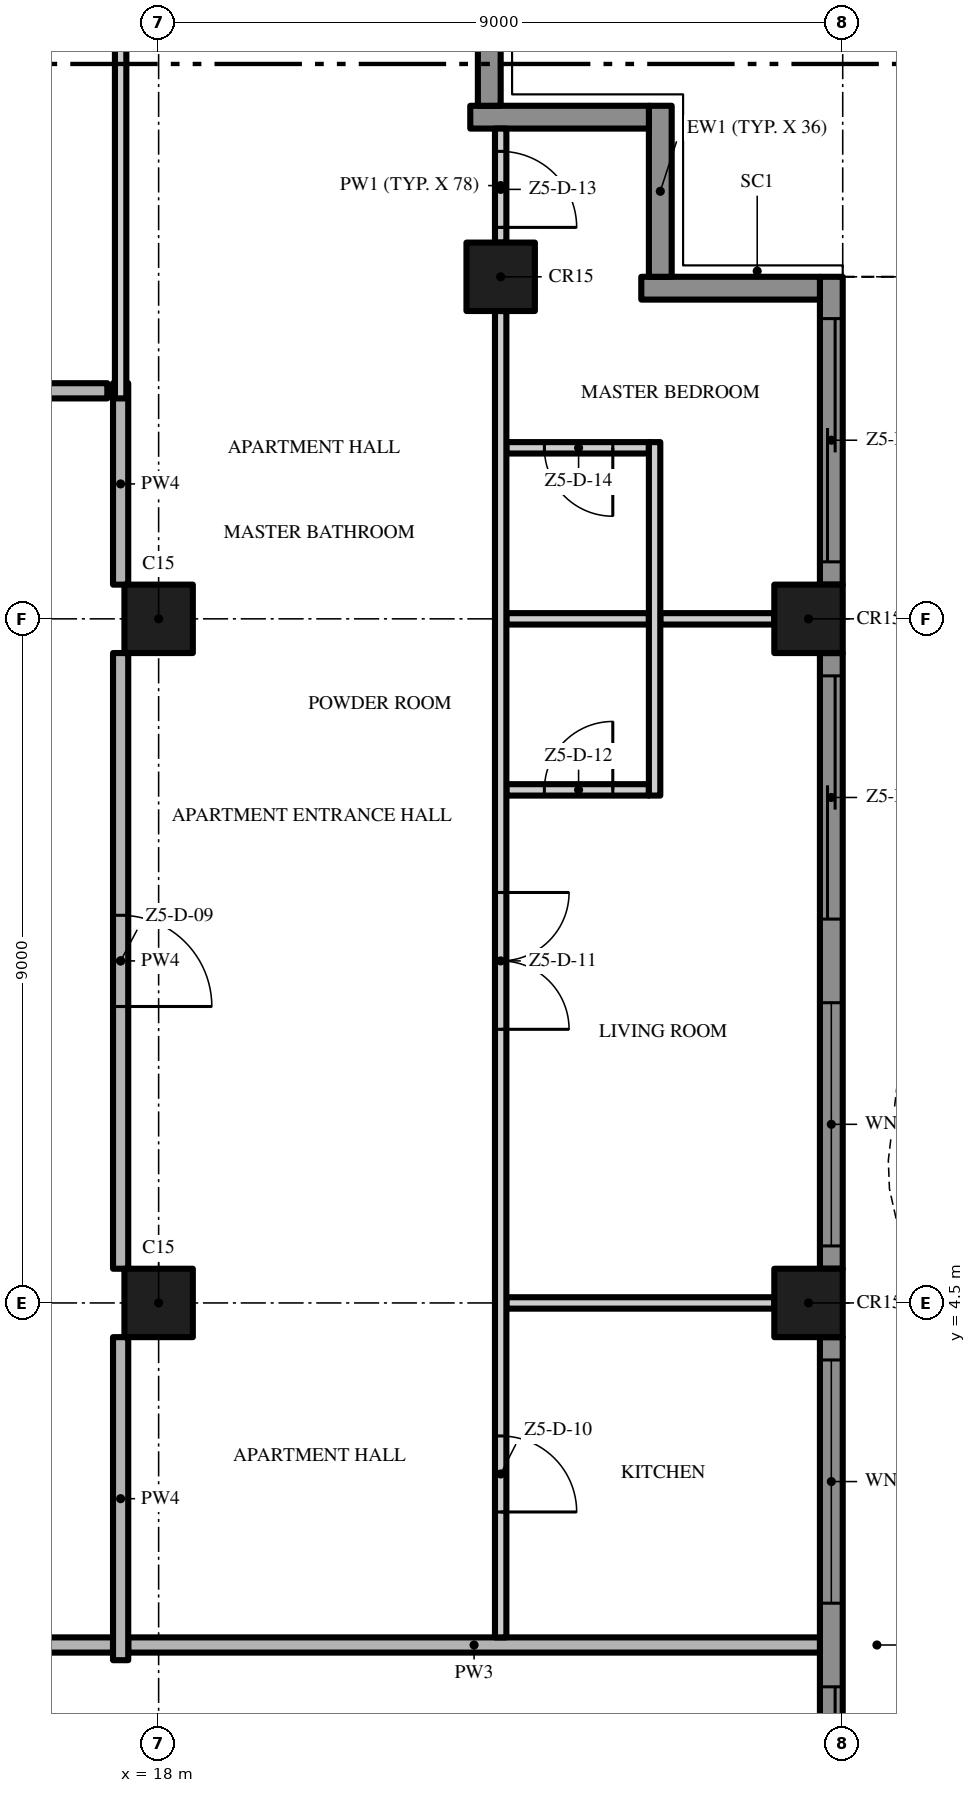
"""IFC4 building model, lengths in metres.
Left out: names, types, materials, properties, quantities, classifications, styles, units other than length and angle.
Written with IfcOpenShell. Run it as: python <this file> out.ifc"""

import sys

from ifc_helpers import new_model, si_unit, direction, frame, frame_2d, origin, origin_2d, place, context, subcontext, project, spatial, polyline, rectangle, outline, extrude, element, fill, save


model = new_model("IFC4")
c1 = context("Model", 3, precision=1e-05, world=origin(), true_north=direction((0.0, 1.0)))
c2 = subcontext(c1, "Body", "Model", "MODEL_VIEW")
j1 = project(units=[si_unit("LENGTHUNIT", "METRE"), si_unit("PLANEANGLEUNIT", "RADIAN")], contexts=[c1])
p1 = place(None, origin())
s1 = spatial("IfcSite", under=j1, at=p1, CompositionType="ELEMENT")
p2 = place(p1, origin())
s2 = spatial("IfcBuilding", under=s1, at=p2, CompositionType="ELEMENT")
p3 = place(p2, frame((0.0, 0.0, 276.8)))
s3 = spatial("IfcBuildingStorey", under=s2, at=p3, CompositionType="ELEMENT", Elevation=276.8)
for number, where, z_axis, x_axis in (
    (1, (18.0, 13.5, 0.0), (0.0, 0.0, 1.0), (1.0, 0.0, 0.0)),
    (2, (18.0, 4.5, 0.0), (0.0, 0.0, 1.0), (1.0, 0.0, 0.0)),
    (3, (26.55, 13.5, 0.0), (0.0, 0.0, 1.0), (1.0, 0.0, 0.0)),
    (4, (22.5, 18.0, 0.0), (0.0, 0.0, 1.0), (1.0, 0.0, 0.0)),
    (5, (26.55, 4.5, 0.0), (0.0, 0.0, 1.0), (1.0, 0.0, 0.0)),
):
    element("IfcColumn", number, at=place(p3, frame(where, z_axis=z_axis, x_axis=x_axis)), inside=s3, PredefinedType="COLUMN", context=c2, shape_type="SweptSolid", body=[
        extrude(rectangle(XDim=0.9, YDim=0.9, at=origin_2d()), origin(), (0.0, 0.0, 1.0), 3.5),
    ])
p4 = place(p3, frame((26.85, 4.05, 0.0), z_axis=(0.0, 0.0, 1.0), x_axis=(0.0, -1.0, 0.0)))
e6 = element("IfcWall", 6, at=p4, inside=s3, PredefinedType="SOLIDWALL", context=c2, shape_type="SweptSolid", body=[
    extrude(rectangle(XDim=8.1, YDim=0.3, at=frame_2d((4.05, 0.0))), origin(), (0.0, 0.0, 1.0), 3.5),
])
p5 = place(p4, frame((4.6, 0.0, 0.0)))
e7 = element("IfcOpeningElement", 7, at=p5, cuts=e6, PredefinedType="OPENING", context=c2, shape_type="SweptSolid", body=[
    extrude(rectangle(XDim=3.2, YDim=2.4, at=frame_2d((1.6, 1.2))), frame((0.0, 0.16, 0.0), z_axis=(0.0, -1.0, 0.0), x_axis=(1.0, 0.0, 0.0)), (0.0, 0.0, 1.0), 0.32),
])
p6 = place(p4, frame((0.3, 0.0, 0.45)))
e8 = element("IfcOpeningElement", 8, at=p6, cuts=e6, PredefinedType="OPENING", context=c2, shape_type="SweptSolid", body=[
    extrude(rectangle(XDim=3.2, YDim=2.65, at=frame_2d((1.6, 1.325))), frame((0.0, 0.16, 0.0), z_axis=(0.0, -1.0, 0.0), x_axis=(1.0, 0.0, 0.0)), (0.0, 0.0, 1.0), 0.32),
])
p7 = place(p3, frame((26.85, 13.05, 0.0), z_axis=(0.0, 0.0, 1.0), x_axis=(0.0, -1.0, 0.0)))
e9 = element("IfcWall", 9, at=p7, inside=s3, PredefinedType="SOLIDWALL", context=c2, shape_type="SweptSolid", body=[
    extrude(rectangle(XDim=8.1, YDim=0.3, at=frame_2d((4.05, 0.0))), origin(), (0.0, 0.0, 1.0), 3.5),
])
p8 = place(p7, frame((4.6, 0.0, 0.45)))
e10 = element("IfcOpeningElement", 10, at=p8, cuts=e9, PredefinedType="OPENING", context=c2, shape_type="SweptSolid", body=[
    extrude(rectangle(XDim=3.2, YDim=2.65, at=frame_2d((1.6, 1.325))), frame((0.0, 0.16, 0.0), z_axis=(0.0, -1.0, 0.0), x_axis=(1.0, 0.0, 0.0)), (0.0, 0.0, 1.0), 0.32),
])
p9 = place(p7, frame((0.3, 0.0, 0.0)))
e11 = element("IfcOpeningElement", 11, at=p9, cuts=e9, PredefinedType="OPENING", context=c2, shape_type="SweptSolid", body=[
    extrude(rectangle(XDim=3.2, YDim=2.4, at=frame_2d((1.6, 1.2))), frame((0.0, 0.16, 0.0), z_axis=(0.0, -1.0, 0.0), x_axis=(1.0, 0.0, 0.0)), (0.0, 0.0, 1.0), 0.32),
])
p10 = place(p3, frame((26.85, 18.0, 0.0), z_axis=(0.0, 0.0, 1.0), x_axis=(0.0, -1.0, 0.0)))
e12 = element("IfcWall", 12, at=p10, inside=s3, PredefinedType="SOLIDWALL", context=c2, shape_type="SweptSolid", body=[
    extrude(rectangle(XDim=4.05, YDim=0.3, at=frame_2d((2.025, 0.0))), origin(), (0.0, 0.0, 1.0), 3.5),
])
p11 = place(p10, frame((0.55, 0.0, 0.0)))
e13 = element("IfcOpeningElement", 13, at=p11, cuts=e12, PredefinedType="OPENING", context=c2, shape_type="SweptSolid", body=[
    extrude(rectangle(XDim=3.2, YDim=2.4, at=frame_2d((1.6, 1.2))), frame((0.0, 0.16, 0.0), z_axis=(0.0, -1.0, 0.0), x_axis=(1.0, 0.0, 0.0)), (0.0, 0.0, 1.0), 0.32),
])
p12 = place(p3, frame((24.35, 17.85, 0.0), z_axis=(0.0, 0.0, 1.0), x_axis=(1.0, 0.0, 0.0)))
e14 = element("IfcWall", 14, at=p12, inside=s3, PredefinedType="SOLIDWALL", context=c2, shape_type="SweptSolid", body=[
    extrude(rectangle(XDim=2.35, YDim=0.3, at=frame_2d((1.175, 0.0))), origin(), (0.0, 0.0, 1.0), 3.5),
])
p13 = place(p3, frame((24.6, 20.25, 0.0), z_axis=(0.0, 0.0, 1.0), x_axis=(0.0, -1.0, 0.0)))
e15 = element("IfcWall", 15, at=p13, inside=s3, PredefinedType="SOLIDWALL", context=c2, shape_type="SweptSolid", body=[
    extrude(rectangle(XDim=2.25, YDim=0.3, at=frame_2d((1.125, 0.0))), origin(), (0.0, 0.0, 1.0), 3.5),
])
p14 = place(p3, frame((22.1, 20.1, 0.0), z_axis=(0.0, 0.0, 1.0), x_axis=(1.0, 0.0, 0.0)))
e16 = element("IfcWall", 16, at=p14, inside=s3, PredefinedType="SOLIDWALL", context=c2, shape_type="SweptSolid", body=[
    extrude(rectangle(XDim=2.35, YDim=0.3, at=frame_2d((1.175, 0.0))), origin(), (0.0, 0.0, 1.0), 3.5),
])
p15 = place(p3, frame((22.35, 22.5, 0.0), z_axis=(0.0, 0.0, 1.0), x_axis=(0.0, -1.0, 0.0)))
e17 = element("IfcWall", 17, at=p15, inside=s3, PredefinedType="SOLIDWALL", context=c2, shape_type="SweptSolid", body=[
    extrude(rectangle(XDim=2.25, YDim=0.3, at=frame_2d((1.125, 0.0))), origin(), (0.0, 0.0, 1.0), 3.5),
])
p16 = place(p3, origin())
e18 = element("IfcWall", 18, at=p16, inside=s3, PredefinedType="USERDEFINED", context=c2, shape_type="SweptSolid", body=[
    extrude(outline(polyline([(29.649, -18.0), (29.985, -16.5), (30.0, -16.125), (29.869, -15.0), (29.345, -13.5), (28.612, -12.0), (27.951, -10.5), (27.615, -9.0), (27.6, -8.625), (27.731, -7.5), (28.255, -6.0), (28.988, -4.5), (29.649, -3.0), (29.985, -1.5), (30.0, -1.125), (29.869, 0.0), (29.345, 1.5), (28.612, 3.0), (27.951, 4.5), (27.615, 6.0), (27.6, 6.375), (27.731, 7.5), (28.255, 9.0), (28.988, 10.5), (29.649, 12.0), (29.985, 13.5), (30.0, 13.875), (29.869, 15.0), (29.345, 16.5), (28.612, 18.0), (28.388, 17.89), (29.114, 16.404), (29.624, 14.944), (29.749, 13.865), (29.736, 13.533), (29.41, 12.079), (28.761, 10.605), (28.024, 9.096), (27.486, 7.556), (27.349, 6.385), (27.366, 5.967), (27.713, 4.421), (28.385, 2.895), (29.114, 1.404), (29.624, -0.056), (29.749, -1.135), (29.736, -1.467), (29.41, -2.921), (28.761, -4.395), (28.024, -5.904), (27.486, -7.444), (27.349, -8.615), (27.366, -9.033), (27.713, -10.579), (28.385, -12.105), (29.114, -13.596), (29.624, -15.056), (29.749, -16.135), (29.736, -16.467), (29.405, -17.945), (29.649, -18.0)])), origin(), (0.0, 0.0, 1.0), 0.9),
])
p17 = place(p3, frame((17.4, 0.0, 0.0), z_axis=(0.0, 0.0, 1.0), x_axis=(-1.0, 0.0, 0.0)))
e19 = element("IfcWall", 19, at=p17, inside=s3, PredefinedType="PARTITIONING", context=c2, shape_type="SweptSolid", body=[
    extrude(rectangle(XDim=34.8, YDim=0.2, at=frame_2d((17.4, 0.0))), origin(), (0.0, 0.0, 1.0), 3.5),
])
p18 = place(p17, frame((25.65, 0.0, 0.0)))
e20 = element("IfcOpeningElement", 20, at=p18, cuts=e19, PredefinedType="OPENING", context=c2, shape_type="SweptSolid", body=[
    extrude(rectangle(XDim=1.5, YDim=2.4, at=frame_2d((0.75, 1.2))), frame((0.0, 0.11, 0.0), z_axis=(0.0, -1.0, 0.0), x_axis=(1.0, 0.0, 0.0)), (0.0, 0.0, 1.0), 0.22),
])
p19 = place(p17, frame((7.65, 0.0, 0.0)))
e21 = element("IfcOpeningElement", 21, at=p19, cuts=e19, PredefinedType="OPENING", context=c2, shape_type="SweptSolid", body=[
    extrude(rectangle(XDim=1.5, YDim=2.4, at=frame_2d((0.75, 1.2))), frame((0.0, 0.11, 0.0), z_axis=(0.0, -1.0, 0.0), x_axis=(1.0, 0.0, 0.0)), (0.0, 0.0, 1.0), 0.22),
])
p20 = place(p3, frame((17.6, 0.0, 0.0), z_axis=(0.0, 0.0, 1.0), x_axis=(1.0, 0.0, 0.0)))
e22 = element("IfcWall", 22, at=p20, inside=s3, PredefinedType="PARTITIONING", context=c2, shape_type="SweptSolid", body=[
    extrude(rectangle(XDim=9.1, YDim=0.2, at=frame_2d((4.55, 0.0))), origin(), (0.0, 0.0, 1.0), 3.5),
])
p21 = place(p3, frame((22.575, 4.5, 0.0), z_axis=(0.0, 0.0, 1.0), x_axis=(1.0, 0.0, 0.0)))
e23 = element("IfcWall", 23, at=p21, inside=s3, PredefinedType="PARTITIONING", context=c2, shape_type="SweptSolid", body=[
    extrude(rectangle(XDim=3.525, YDim=0.15, at=frame_2d((1.762, 0.0))), origin(), (0.0, 0.0, 1.0), 3.5),
])
p22 = place(p3, frame((22.575, 11.25, 0.0), z_axis=(0.0, 0.0, 1.0), x_axis=(1.0, 0.0, 0.0)))
e24 = element("IfcWall", 24, at=p22, inside=s3, PredefinedType="PARTITIONING", context=c2, shape_type="SweptSolid", body=[
    extrude(rectangle(XDim=1.875, YDim=0.15, at=frame_2d((0.938, 0.0))), origin(), (0.0, 0.0, 1.0), 3.5),
])
p23 = place(p22, frame((0.5, 0.0, 0.0)))
e25 = element("IfcOpeningElement", 25, at=p23, cuts=e24, PredefinedType="OPENING", context=c2, shape_type="SweptSolid", body=[
    extrude(rectangle(XDim=0.9, YDim=2.1, at=frame_2d((0.45, 1.05))), frame((0.0, 0.085, 0.0), z_axis=(0.0, -1.0, 0.0), x_axis=(1.0, 0.0, 0.0)), (0.0, 0.0, 1.0), 0.17),
])
p24 = place(p3, frame((22.575, 13.5, 0.0), z_axis=(0.0, 0.0, 1.0), x_axis=(1.0, 0.0, 0.0)))
e26 = element("IfcWall", 26, at=p24, inside=s3, PredefinedType="PARTITIONING", context=c2, shape_type="SweptSolid", body=[
    extrude(rectangle(XDim=1.875, YDim=0.15, at=frame_2d((0.938, 0.0))), origin(), (0.0, 0.0, 1.0), 3.5),
])
p25 = place(p3, frame((24.6, 13.5, 0.0), z_axis=(0.0, 0.0, 1.0), x_axis=(1.0, 0.0, 0.0)))
e27 = element("IfcWall", 27, at=p25, inside=s3, PredefinedType="PARTITIONING", context=c2, shape_type="SweptSolid", body=[
    extrude(rectangle(XDim=1.5, YDim=0.15, at=frame_2d((0.75, 0.0))), origin(), (0.0, 0.0, 1.0), 3.5),
])
p26 = place(p3, frame((24.45, 15.75, 0.0), z_axis=(0.0, 0.0, 1.0), x_axis=(-1.0, 0.0, 0.0)))
e28 = element("IfcWall", 28, at=p26, inside=s3, PredefinedType="PARTITIONING", context=c2, shape_type="SweptSolid", body=[
    extrude(rectangle(XDim=1.875, YDim=0.15, at=frame_2d((0.938, 0.0))), origin(), (0.0, 0.0, 1.0), 3.5),
])
p27 = place(p26, frame((0.475, 0.0, 0.0)))
e29 = element("IfcOpeningElement", 29, at=p27, cuts=e28, PredefinedType="OPENING", context=c2, shape_type="SweptSolid", body=[
    extrude(rectangle(XDim=0.9, YDim=2.1, at=frame_2d((0.45, 1.05))), frame((0.0, 0.085, 0.0), z_axis=(0.0, -1.0, 0.0), x_axis=(1.0, 0.0, 0.0)), (0.0, 0.0, 1.0), 0.17),
])
p28 = place(p3, frame((13.5, 16.5, 0.0), z_axis=(0.0, 0.0, 1.0), x_axis=(1.0, 0.0, 0.0)))
e30 = element("IfcWall", 30, at=p28, inside=s3, PredefinedType="PARTITIONING", context=c2, shape_type="SweptSolid", body=[
    extrude(rectangle(XDim=3.825, YDim=0.2, at=frame_2d((1.913, 0.0))), origin(), (0.0, 0.0, 1.0), 3.5),
])
p29 = place(p28, frame((1.55, 0.0, 0.0)))
e31 = element("IfcOpeningElement", 31, at=p29, cuts=e30, PredefinedType="OPENING", context=c2, shape_type="SweptSolid", body=[
    extrude(rectangle(XDim=0.9, YDim=2.1, at=frame_2d((0.45, 1.05))), frame((0.0, 0.11, 0.0), z_axis=(0.0, -1.0, 0.0), x_axis=(1.0, 0.0, 0.0)), (0.0, 0.0, 1.0), 0.22),
])
p30 = place(p3, frame((17.5, -0.2, 0.0), z_axis=(0.0, 0.0, 1.0), x_axis=(0.0, 1.0, 0.0)))
e32 = element("IfcWall", 32, at=p30, inside=s3, PredefinedType="PARTITIONING", context=c2, shape_type="SweptSolid", body=[
    extrude(rectangle(XDim=4.25, YDim=0.2, at=frame_2d((2.125, 0.0))), origin(), (0.0, 0.0, 1.0), 3.5),
])
p31 = place(p3, frame((17.5, 13.05, 0.0), z_axis=(0.0, 0.0, 1.0), x_axis=(0.0, -1.0, 0.0)))
e33 = element("IfcWall", 33, at=p31, inside=s3, PredefinedType="PARTITIONING", context=c2, shape_type="SweptSolid", body=[
    extrude(rectangle(XDim=8.1, YDim=0.2, at=frame_2d((4.05, 0.0))), origin(), (0.0, 0.0, 1.0), 3.5),
])
p32 = place(p31, frame((3.45, 0.0, 0.0)))
e34 = element("IfcOpeningElement", 34, at=p32, cuts=e33, PredefinedType="OPENING", context=c2, shape_type="SweptSolid", body=[
    extrude(rectangle(XDim=1.2, YDim=2.4, at=frame_2d((0.6, 1.2))), frame((0.0, 0.11, 0.0), z_axis=(0.0, -1.0, 0.0), x_axis=(1.0, 0.0, 0.0)), (0.0, 0.0, 1.0), 0.22),
])
p33 = place(p3, frame((17.5, 13.95, 0.0), z_axis=(0.0, 0.0, 1.0), x_axis=(0.0, 1.0, 0.0)))
e35 = element("IfcWall", 35, at=p33, inside=s3, PredefinedType="PARTITIONING", context=c2, shape_type="SweptSolid", body=[
    extrude(rectangle(XDim=2.65, YDim=0.2, at=frame_2d((1.325, 0.0))), origin(), (0.0, 0.0, 1.0), 3.5),
])
p34 = place(p3, frame((17.5, 16.4, 0.0), z_axis=(0.0, 0.0, 1.0), x_axis=(0.0, 1.0, 0.0)))
e36 = element("IfcWall", 36, at=p34, inside=s3, PredefinedType="PARTITIONING", context=c2, shape_type="SweptSolid", body=[
    extrude(rectangle(XDim=5.2, YDim=0.15, at=frame_2d((2.6, 0.0))), origin(), (0.0, 0.0, 1.0), 3.5),
])
p35 = place(p3, frame((22.5, 17.55, 0.0), z_axis=(0.0, 0.0, 1.0), x_axis=(0.0, -1.0, 0.0)))
e37 = element("IfcWall", 37, at=p35, inside=s3, PredefinedType="PARTITIONING", context=c2, shape_type="SweptSolid", body=[
    extrude(rectangle(XDim=17.45, YDim=0.15, at=frame_2d((8.725, 0.0))), origin(), (0.0, 0.0, 1.0), 3.5),
])
p36 = place(p35, frame((14.8, 0.0, 0.0)))
e38 = element("IfcOpeningElement", 38, at=p36, cuts=e37, PredefinedType="OPENING", context=c2, shape_type="SweptSolid", body=[
    extrude(rectangle(XDim=1.0, YDim=2.4, at=frame_2d((0.5, 1.2))), frame((0.0, 0.085, 0.0), z_axis=(0.0, -1.0, 0.0), x_axis=(1.0, 0.0, 0.0)), (0.0, 0.0, 1.0), 0.17),
])
p37 = place(p35, frame((7.65, 0.0, 0.0)))
e39 = element("IfcOpeningElement", 39, at=p37, cuts=e37, PredefinedType="OPENING", context=c2, shape_type="SweptSolid", body=[
    extrude(rectangle(XDim=1.8, YDim=2.4, at=frame_2d((0.9, 1.2))), frame((0.0, 0.085, 0.0), z_axis=(0.0, -1.0, 0.0), x_axis=(1.0, 0.0, 0.0)), (0.0, 0.0, 1.0), 0.17),
])
p38 = place(p3, frame((22.5, 19.95, 0.0), z_axis=(0.0, 0.0, 1.0), x_axis=(0.0, -1.0, 0.0)))
e40 = element("IfcWall", 40, at=p38, inside=s3, PredefinedType="PARTITIONING", context=c2, shape_type="SweptSolid", body=[
    extrude(rectangle(XDim=1.5, YDim=0.15, at=frame_2d((0.75, 0.0))), origin(), (0.0, 0.0, 1.0), 3.5),
])
p39 = place(p38, frame((0.3, 0.0, 0.0)))
e41 = element("IfcOpeningElement", 41, at=p39, cuts=e40, PredefinedType="OPENING", context=c2, shape_type="SweptSolid", body=[
    extrude(rectangle(XDim=1.0, YDim=2.4, at=frame_2d((0.5, 1.2))), frame((0.0, 0.085, 0.0), z_axis=(0.0, -1.0, 0.0), x_axis=(1.0, 0.0, 0.0)), (0.0, 0.0, 1.0), 0.17),
])
p40 = place(p3, frame((24.525, 11.175, 0.0), z_axis=(0.0, 0.0, 1.0), x_axis=(0.0, 1.0, 0.0)))
e42 = element("IfcWall", 42, at=p40, inside=s3, PredefinedType="PARTITIONING", context=c2, shape_type="SweptSolid", body=[
    extrude(rectangle(XDim=4.65, YDim=0.15, at=frame_2d((2.325, 0.0))), origin(), (0.0, 0.0, 1.0), 3.5),
])
p41 = place(p5, origin())
e43 = element("IfcDoor", 43, at=p41, inside=s3, OperationType="SINGLE_SWING_LEFT", PredefinedType="DOOR", context=c2, shape_type="SweptSolid", body=[
    extrude(rectangle(XDim=3.2, YDim=2.4, at=frame_2d((1.6, 1.2))), frame((0.0, 0.025, 0.0), z_axis=(0.0, -1.0, 0.0), x_axis=(1.0, 0.0, 0.0)), (0.0, 0.0, 1.0), 0.05),
])
fill(e7, e43)
p42 = place(p6, origin())
e44 = element("IfcWindow", 44, at=p42, inside=s3, PartitioningType="SINGLE_PANEL", PredefinedType="WINDOW", context=c2, shape_type="SweptSolid", body=[
    extrude(rectangle(XDim=3.2, YDim=2.65, at=frame_2d((1.6, 1.325))), frame((0.0, 0.03, 0.0), z_axis=(0.0, -1.0, 0.0), x_axis=(1.0, 0.0, 0.0)), (0.0, 0.0, 1.0), 0.06),
])
fill(e8, e44)
p43 = place(p8, origin())
e45 = element("IfcWindow", 45, at=p43, inside=s3, PartitioningType="SINGLE_PANEL", PredefinedType="WINDOW", context=c2, shape_type="SweptSolid", body=[
    extrude(rectangle(XDim=3.2, YDim=2.65, at=frame_2d((1.6, 1.325))), frame((0.0, 0.03, 0.0), z_axis=(0.0, -1.0, 0.0), x_axis=(1.0, 0.0, 0.0)), (0.0, 0.0, 1.0), 0.06),
])
fill(e10, e45)
p44 = place(p9, origin())
e46 = element("IfcDoor", 46, at=p44, inside=s3, OperationType="SINGLE_SWING_LEFT", PredefinedType="DOOR", context=c2, shape_type="SweptSolid", body=[
    extrude(rectangle(XDim=3.2, YDim=2.4, at=frame_2d((1.6, 1.2))), frame((0.0, 0.025, 0.0), z_axis=(0.0, -1.0, 0.0), x_axis=(1.0, 0.0, 0.0)), (0.0, 0.0, 1.0), 0.05),
])
fill(e11, e46)
p45 = place(p11, origin())
e47 = element("IfcDoor", 47, at=p45, inside=s3, OperationType="SINGLE_SWING_LEFT", PredefinedType="DOOR", context=c2, shape_type="SweptSolid", body=[
    extrude(rectangle(XDim=3.2, YDim=2.4, at=frame_2d((1.6, 1.2))), frame((0.0, 0.025, 0.0), z_axis=(0.0, -1.0, 0.0), x_axis=(1.0, 0.0, 0.0)), (0.0, 0.0, 1.0), 0.05),
])
fill(e13, e47)
p46 = place(p32, origin())
e48 = element("IfcDoor", 48, at=p46, inside=s3, OperationType="SINGLE_SWING_RIGHT", PredefinedType="DOOR", context=c2, shape_type="SweptSolid", body=[
    extrude(rectangle(XDim=1.2, YDim=2.4, at=frame_2d((0.6, 1.2))), frame((0.0, 0.025, 0.0), z_axis=(0.0, -1.0, 0.0), x_axis=(1.0, 0.0, 0.0)), (0.0, 0.0, 1.0), 0.05),
])
fill(e34, e48)
p47 = place(p36, origin())
e49 = element("IfcDoor", 49, at=p47, inside=s3, OperationType="SINGLE_SWING_RIGHT", PredefinedType="DOOR", context=c2, shape_type="SweptSolid", body=[
    extrude(rectangle(XDim=1.0, YDim=2.4, at=frame_2d((0.5, 1.2))), frame((0.0, 0.025, 0.0), z_axis=(0.0, -1.0, 0.0), x_axis=(1.0, 0.0, 0.0)), (0.0, 0.0, 1.0), 0.05),
])
fill(e38, e49)
p48 = place(p37, origin())
e50 = element("IfcDoor", 50, at=p48, inside=s3, OperationType="DOUBLE_DOOR_SINGLE_SWING", PredefinedType="DOOR", context=c2, shape_type="SweptSolid", body=[
    extrude(rectangle(XDim=1.8, YDim=2.4, at=frame_2d((0.9, 1.2))), frame((0.0, 0.025, 0.0), z_axis=(0.0, -1.0, 0.0), x_axis=(1.0, 0.0, 0.0)), (0.0, 0.0, 1.0), 0.05),
])
fill(e39, e50)
p49 = place(p23, origin())
e51 = element("IfcDoor", 51, at=p49, inside=s3, OperationType="SINGLE_SWING_RIGHT", PredefinedType="DOOR", context=c2, shape_type="SweptSolid", body=[
    extrude(rectangle(XDim=0.9, YDim=2.1, at=frame_2d((0.45, 1.05))), frame((0.0, 0.025, 0.0), z_axis=(0.0, -1.0, 0.0), x_axis=(1.0, 0.0, 0.0)), (0.0, 0.0, 1.0), 0.05),
])
fill(e25, e51)
p50 = place(p39, origin())
e52 = element("IfcDoor", 52, at=p50, inside=s3, OperationType="SINGLE_SWING_RIGHT", PredefinedType="DOOR", context=c2, shape_type="SweptSolid", body=[
    extrude(rectangle(XDim=1.0, YDim=2.4, at=frame_2d((0.5, 1.2))), frame((0.0, 0.025, 0.0), z_axis=(0.0, -1.0, 0.0), x_axis=(1.0, 0.0, 0.0)), (0.0, 0.0, 1.0), 0.05),
])
fill(e41, e52)
p51 = place(p27, origin())
e53 = element("IfcDoor", 53, at=p51, inside=s3, OperationType="SINGLE_SWING_LEFT", PredefinedType="DOOR", context=c2, shape_type="SweptSolid", body=[
    extrude(rectangle(XDim=0.9, YDim=2.1, at=frame_2d((0.45, 1.05))), frame((0.0, 0.025, 0.0), z_axis=(0.0, -1.0, 0.0), x_axis=(1.0, 0.0, 0.0)), (0.0, 0.0, 1.0), 0.05),
])
fill(e29, e53)
save(model, sys.argv[1])
